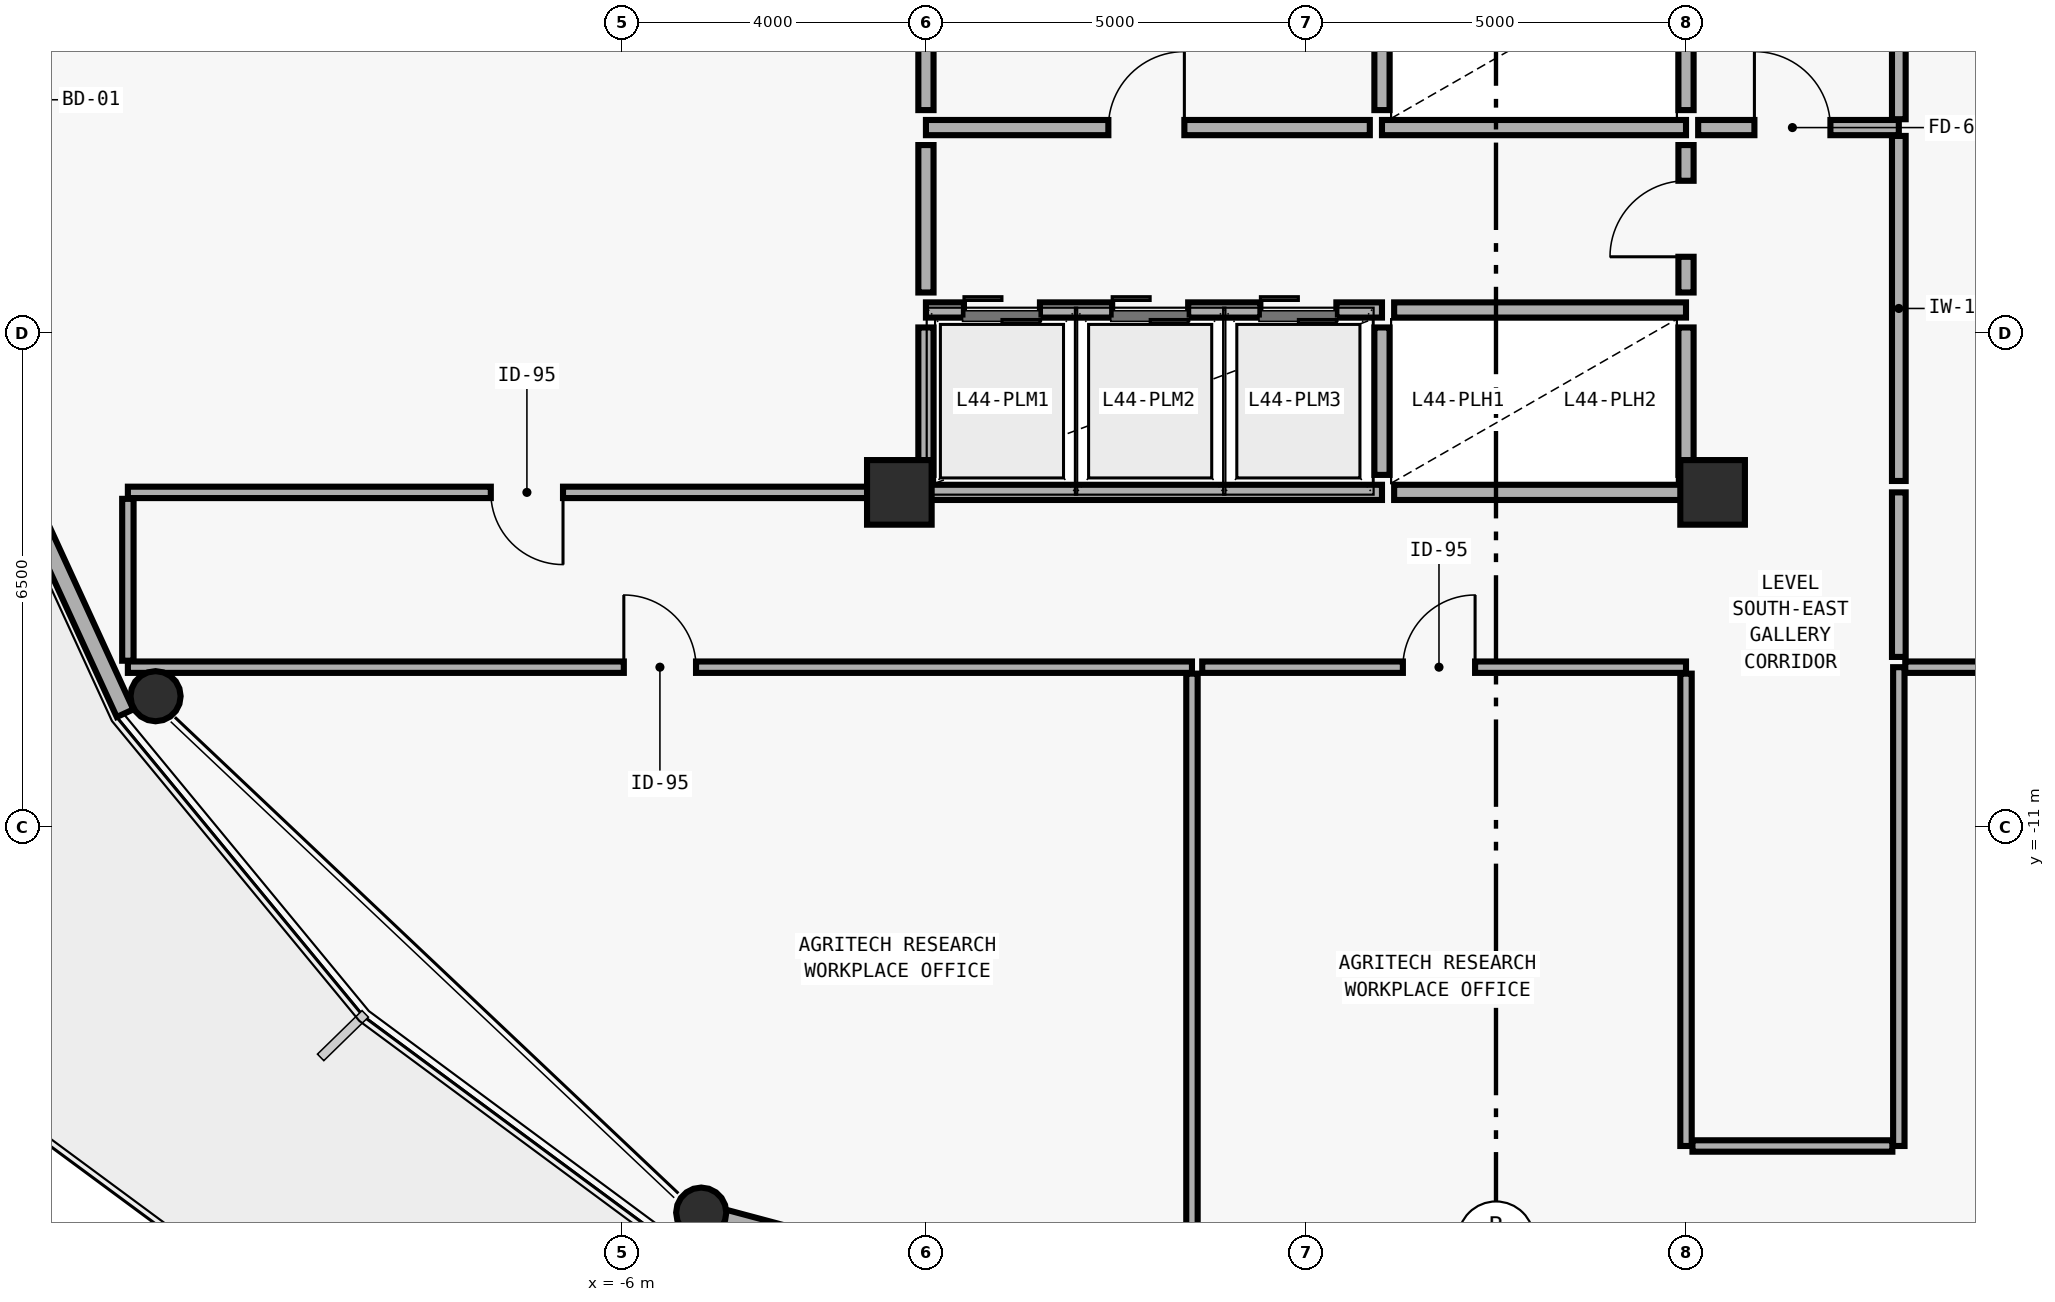
"""IFC4 building model, lengths in metres.
Left out: names, types, materials, properties, quantities, classifications, styles, units other than length and angle.
Written with IfcOpenShell. Run it as: python <this file> out.ifc"""

import sys

from ifc_helpers import new_model, si_unit, direction, frame, frame_2d, origin, origin_2d, place, context, subcontext, project, spatial, rectangle, hollow_circle, extrude, element, fill, save


model = new_model("IFC4")
c1 = context("Model", 3, precision=1e-05, world=origin(), true_north=direction((0.0, 1.0)))
c2 = subcontext(c1, "Body", "Model", "MODEL_VIEW")
j1 = project(units=[si_unit("LENGTHUNIT", "METRE"), si_unit("PLANEANGLEUNIT", "RADIAN")], contexts=[c1])
p1 = place(None, origin())
s1 = spatial("IfcSite", under=j1, at=p1, CompositionType="ELEMENT")
p2 = place(p1, origin())
s2 = spatial("IfcBuilding", under=s1, at=p2, CompositionType="ELEMENT")
p3 = place(p2, frame((0.0, 0.0, 178.8)))
s3 = spatial("IfcBuildingStorey", under=s2, at=p3, CompositionType="ELEMENT", Elevation=178.8)
for number, where, z_axis, x_axis in (
    (1, (-2.35, -6.6, 0.0), (0.0, 0.0, 1.0), (1.0, 0.0, 0.0)),
    (2, (8.35, -6.6, 0.0), (0.0, 0.0, 1.0), (1.0, 0.0, 0.0)),
):
    element("IfcColumn", number, at=place(p3, frame(where, z_axis=z_axis, x_axis=x_axis)), inside=s3, PredefinedType="COLUMN", context=c2, shape_type="SweptSolid", body=[
        extrude(rectangle(XDim=0.85, YDim=0.85, at=origin_2d()), origin(), (0.0, 0.0, 1.0), 3.575),
    ])
p4 = place(p3, frame((-12.165, -9.291, 0.0), z_axis=(0.016251167856, 0.004779755252, 0.999856516448), x_axis=(-0.282166323992, 0.959365501571, 0.0)))
e3 = element("IfcColumn", 3, at=p4, inside=s3, PredefinedType="COLUMN", context=c2, shape_type="SweptSolid", body=[
    extrude(hollow_circle(Radius=0.33, WallThickness=0.025, at=origin_2d()), origin(), (0.0, 0.0, 1.0), 3.575),
])
p5 = place(p3, frame((-4.973, -16.092, 0.0), z_axis=(0.00935528271, 0.008194408213, 0.999922662189), x_axis=(-0.658893247603, 0.75223645768, 0.0)))
e4 = element("IfcColumn", 4, at=p5, inside=s3, PredefinedType="COLUMN", context=c2, shape_type="SweptSolid", body=[
    extrude(hollow_circle(Radius=0.33, WallThickness=0.025, at=origin_2d()), origin(), (0.0, 0.0, 1.0), 3.575),
])
p6 = place(p3, frame((-12.537, -9.506, 0.0), z_axis=(0.0, 0.0, 1.0), x_axis=(-0.416959519789, 0.908925056788, 0.0)))
e5 = element("IfcWall", 5, at=p6, inside=s3, PredefinedType="SOLIDWALL", context=c2, shape_type="SweptSolid", body=[
    extrude(rectangle(XDim=5.019, YDim=0.24, at=frame_2d((2.51, 0.0))), origin(), (0.0, 0.0, 1.0), 2.93),
])
p7 = place(p3, frame((4.575, -18.642, 0.0), z_axis=(0.0, 0.0, 1.0), x_axis=(-0.966124239296, 0.258077419091, 0.0)))
e6 = element("IfcWall", 6, at=p7, inside=s3, PredefinedType="SOLIDWALL", context=c2, shape_type="SweptSolid", body=[
    extrude(rectangle(XDim=9.598, YDim=0.28, at=frame_2d((4.799, 0.0))), origin(), (0.0, 0.0, 1.0), 2.93),
])
p8 = place(p3, frame((4.0, -1.8, 0.0), z_axis=(0.0, 0.0, 1.0), x_axis=(1.0, 0.0, 0.0)))
e7 = element("IfcWall", 7, at=p8, inside=s3, PredefinedType="SOLIDWALL", context=c2, shape_type="SweptSolid", body=[
    extrude(rectangle(XDim=4.0, YDim=0.2, at=frame_2d((2.0, 0.0))), origin(), (0.0, 0.0, 1.0), 3.36),
])
p9 = place(p3, frame((4.0, -1.57, 0.0), z_axis=(0.0, 0.0, 1.0), x_axis=(0.0, 1.0, 0.0)))
e8 = element("IfcWall", 8, at=p9, inside=s3, PredefinedType="SOLIDWALL", context=c2, shape_type="SweptSolid", body=[
    extrude(rectangle(XDim=1.94, YDim=0.2, at=frame_2d((0.97, 0.0))), origin(), (0.0, 0.0, 1.0), 3.36),
])
p10 = place(p3, frame((8.0, -1.57, 0.0), z_axis=(0.0, 0.0, 1.0), x_axis=(0.0, 1.0, 0.0)))
e9 = element("IfcWall", 9, at=p10, inside=s3, PredefinedType="SOLIDWALL", context=c2, shape_type="SweptSolid", body=[
    extrude(rectangle(XDim=2.05, YDim=0.2, at=frame_2d((1.025, 0.0))), origin(), (0.0, 0.0, 1.0), 3.012),
])
p11 = place(p3, frame((-2.0, -4.2, 0.0), z_axis=(0.0, 0.0, 1.0), x_axis=(1.0, 0.0, 0.0)))
e10 = element("IfcWall", 10, at=p11, inside=s3, PredefinedType="SOLIDWALL", context=c2, shape_type="SweptSolid", body=[
    extrude(rectangle(XDim=6.0, YDim=0.2, at=frame_2d((3.0, 0.0))), origin(), (0.0, 0.0, 1.0), 3.36),
])
p12 = place(p11, frame((0.5, 0.0, 0.0)))
e11 = element("IfcOpeningElement", 11, at=p12, cuts=e10, PredefinedType="OPENING", context=c2, shape_type="SweptSolid", body=[
    extrude(rectangle(XDim=1.0, YDim=2.2, at=frame_2d((0.5, 1.1))), frame((0.0, 0.11, 0.0), z_axis=(0.0, -1.0, 0.0), x_axis=(1.0, 0.0, 0.0)), (0.0, 0.0, 1.0), 0.22),
])
p13 = place(p11, frame((2.45, 0.0, 0.0)))
e12 = element("IfcOpeningElement", 12, at=p13, cuts=e10, PredefinedType="OPENING", context=c2, shape_type="SweptSolid", body=[
    extrude(rectangle(XDim=1.0, YDim=2.2, at=frame_2d((0.5, 1.1))), frame((0.0, 0.11, 0.0), z_axis=(0.0, -1.0, 0.0), x_axis=(1.0, 0.0, 0.0)), (0.0, 0.0, 1.0), 0.22),
])
p14 = place(p11, frame((4.4, 0.0, 0.0)))
e13 = element("IfcOpeningElement", 13, at=p14, cuts=e10, PredefinedType="OPENING", context=c2, shape_type="SweptSolid", body=[
    extrude(rectangle(XDim=1.0, YDim=2.2, at=frame_2d((0.5, 1.1))), frame((0.0, 0.11, 0.0), z_axis=(0.0, -1.0, 0.0), x_axis=(1.0, 0.0, 0.0)), (0.0, 0.0, 1.0), 0.22),
])
p15 = place(p3, frame((-2.0, -6.6, 0.0), z_axis=(0.0, 0.0, 1.0), x_axis=(1.0, 0.0, 0.0)))
e14 = element("IfcWall", 14, at=p15, inside=s3, PredefinedType="SOLIDWALL", context=c2, shape_type="SweptSolid", body=[
    extrude(rectangle(XDim=6.0, YDim=0.2, at=frame_2d((3.0, 0.0))), origin(), (0.0, 0.0, 1.0), 3.012),
])
p16 = place(p3, frame((-2.0, -6.37, 0.0), z_axis=(0.0, 0.0, 1.0), x_axis=(0.0, 1.0, 0.0)))
e15 = element("IfcWall", 15, at=p16, inside=s3, PredefinedType="SOLIDWALL", context=c2, shape_type="SweptSolid", body=[
    extrude(rectangle(XDim=1.94, YDim=0.2, at=frame_2d((0.97, 0.0))), origin(), (0.0, 0.0, 1.0), 3.012),
])
p17 = place(p3, frame((4.16, -4.2, 0.0), z_axis=(0.0, 0.0, 1.0), x_axis=(1.0, 0.0, 0.0)))
e16 = element("IfcWall", 16, at=p17, inside=s3, PredefinedType="SOLIDWALL", context=c2, shape_type="SweptSolid", body=[
    extrude(rectangle(XDim=3.84, YDim=0.2, at=frame_2d((1.92, 0.0))), origin(), (0.0, 0.0, 1.0), 3.36),
])
p18 = place(p3, frame((4.16, -6.6, 0.0), z_axis=(0.0, 0.0, 1.0), x_axis=(1.0, 0.0, 0.0)))
e17 = element("IfcWall", 17, at=p18, inside=s3, PredefinedType="SOLIDWALL", context=c2, shape_type="SweptSolid", body=[
    extrude(rectangle(XDim=3.84, YDim=0.2, at=frame_2d((1.92, 0.0))), origin(), (0.0, 0.0, 1.0), 3.012),
])
p19 = place(p3, frame((4.0, -6.37, 0.0), z_axis=(0.0, 0.0, 1.0), x_axis=(0.0, 1.0, 0.0)))
e18 = element("IfcWall", 18, at=p19, inside=s3, PredefinedType="SOLIDWALL", context=c2, shape_type="SweptSolid", body=[
    extrude(rectangle(XDim=1.94, YDim=0.2, at=frame_2d((0.97, 0.0))), origin(), (0.0, 0.0, 1.0), 3.36),
])
p20 = place(p3, frame((8.0, -6.37, 0.0), z_axis=(0.0, 0.0, 1.0), x_axis=(0.0, 1.0, 0.0)))
e19 = element("IfcWall", 19, at=p20, inside=s3, PredefinedType="SOLIDWALL", context=c2, shape_type="SweptSolid", body=[
    extrude(rectangle(XDim=1.94, YDim=0.2, at=frame_2d((0.97, 0.0))), origin(), (0.0, 0.0, 1.0), 3.012),
])
p21 = place(p3, frame((8.0, -3.97, 0.0), z_axis=(0.0, 0.0, 1.0), x_axis=(0.0, 1.0, 0.0)))
e20 = element("IfcWall", 20, at=p21, inside=s3, PredefinedType="MOVABLE", context=c2, shape_type="SweptSolid", body=[
    extrude(rectangle(XDim=1.94, YDim=0.2, at=frame_2d((0.97, 0.0))), origin(), (0.0, 0.0, 1.0), 3.012),
])
p22 = place(p21, frame((0.47, 0.0, 0.0)))
e21 = element("IfcOpeningElement", 21, at=p22, cuts=e20, PredefinedType="OPENING", context=c2, shape_type="SweptSolid", body=[
    extrude(rectangle(XDim=1.0, YDim=2.1, at=frame_2d((0.5, 1.05))), frame((0.0, 0.11, 0.0), z_axis=(0.0, -1.0, 0.0), x_axis=(1.0, 0.0, 0.0)), (0.0, 0.0, 1.0), 0.22),
])
p23 = place(p3, frame((-2.0, -1.8, 0.0), z_axis=(0.0, 0.0, 1.0), x_axis=(1.0, 0.0, 0.0)))
e22 = element("IfcWall", 22, at=p23, inside=s3, PredefinedType="MOVABLE", context=c2, shape_type="SweptSolid", body=[
    extrude(rectangle(XDim=5.84, YDim=0.2, at=frame_2d((2.92, 0.0))), origin(), (0.0, 0.0, 1.0), 3.36),
])
p24 = place(p23, frame((2.4, 0.0, 0.0)))
e23 = element("IfcOpeningElement", 23, at=p24, cuts=e22, PredefinedType="OPENING", context=c2, shape_type="SweptSolid", body=[
    extrude(rectangle(XDim=1.0, YDim=2.1, at=frame_2d((0.5, 1.05))), frame((0.0, 0.11, 0.0), z_axis=(0.0, -1.0, 0.0), x_axis=(1.0, 0.0, 0.0)), (0.0, 0.0, 1.0), 0.22),
])
p25 = place(p3, frame((8.16, -1.8, 0.0), z_axis=(0.0, 0.0, 1.0), x_axis=(1.0, 0.0, 0.0)))
e24 = element("IfcWall", 24, at=p25, inside=s3, PredefinedType="MOVABLE", context=c2, shape_type="SweptSolid", body=[
    extrude(rectangle(XDim=2.64, YDim=0.2, at=frame_2d((1.32, 0.0))), origin(), (0.0, 0.0, 1.0), 3.36),
])
p26 = place(p25, frame((0.74, 0.0, 0.0)))
e25 = element("IfcOpeningElement", 25, at=p26, cuts=e24, PredefinedType="OPENING", context=c2, shape_type="SweptSolid", body=[
    extrude(rectangle(XDim=1.0, YDim=2.1, at=frame_2d((0.5, 1.05))), frame((0.0, 0.11, 0.0), z_axis=(0.0, -1.0, 0.0), x_axis=(1.0, 0.0, 0.0)), (0.0, 0.0, 1.0), 0.22),
])
p27 = place(p3, frame((-12.5, -8.9, 0.0), z_axis=(0.0, 0.0, 1.0), x_axis=(1.0, 0.0, 0.0)))
e26 = element("IfcWall", 26, at=p27, inside=s3, PredefinedType="PARTITIONING", context=c2, shape_type="SweptSolid", body=[
    extrude(rectangle(XDim=14.0, YDim=0.15, at=frame_2d((7.0, 0.0))), origin(), (0.0, 0.0, 1.0), 2.842),
])
p28 = place(p27, frame((6.525, 0.0, 0.0)))
e27 = element("IfcOpeningElement", 27, at=p28, cuts=e26, PredefinedType="OPENING", context=c2, shape_type="SweptSolid", body=[
    extrude(rectangle(XDim=0.95, YDim=2.1, at=frame_2d((0.475, 1.05))), frame((0.0, 0.085, 0.0), z_axis=(0.0, -1.0, 0.0), x_axis=(1.0, 0.0, 0.0)), (0.0, 0.0, 1.0), 0.17),
])
p29 = place(p3, frame((1.635, -8.9, 0.0), z_axis=(0.0, 0.0, 1.0), x_axis=(1.0, 0.0, 0.0)))
e28 = element("IfcWall", 28, at=p29, inside=s3, PredefinedType="PARTITIONING", context=c2, shape_type="SweptSolid", body=[
    extrude(rectangle(XDim=6.365, YDim=0.15, at=frame_2d((3.183, 0.0))), origin(), (0.0, 0.0, 1.0), 3.36),
])
p30 = place(p29, frame((2.64, 0.0, 0.0)))
e29 = element("IfcOpeningElement", 29, at=p30, cuts=e28, PredefinedType="OPENING", context=c2, shape_type="SweptSolid", body=[
    extrude(rectangle(XDim=0.95, YDim=2.1, at=frame_2d((0.475, 1.05))), frame((0.0, 0.085, 0.0), z_axis=(0.0, -1.0, 0.0), x_axis=(1.0, 0.0, 0.0)), (0.0, 0.0, 1.0), 0.17),
])
p31 = place(p3, frame((-2.16, -6.6, 0.0), z_axis=(0.0, 0.0, 1.0), x_axis=(-1.0, 0.0, 0.0)))
e30 = element("IfcWall", 30, at=p31, inside=s3, PredefinedType="PARTITIONING", context=c2, shape_type="SweptSolid", body=[
    extrude(rectangle(XDim=10.34, YDim=0.15, at=frame_2d((5.17, 0.0))), origin(), (0.0, 0.0, 1.0), 2.842),
])
p32 = place(p31, frame((4.615, 0.0, 0.0)))
e31 = element("IfcOpeningElement", 31, at=p32, cuts=e30, PredefinedType="OPENING", context=c2, shape_type="SweptSolid", body=[
    extrude(rectangle(XDim=0.95, YDim=2.1, at=frame_2d((0.475, 1.05))), frame((0.0, 0.085, 0.0), z_axis=(0.0, -1.0, 0.0), x_axis=(1.0, 0.0, 0.0)), (0.0, 0.0, 1.0), 0.17),
])
p33 = place(p3, frame((10.8, -1.69, 0.0), z_axis=(0.0, 0.0, 1.0), x_axis=(0.0, 1.0, 0.0)))
e32 = element("IfcWall", 32, at=p33, inside=s3, PredefinedType="PLUMBINGWALL", context=c2, shape_type="SweptSolid", body=[
    extrude(rectangle(XDim=5.19, YDim=0.18, at=frame_2d((2.595, 0.0))), origin(), (0.0, 0.0, 1.0), 3.36),
])
p34 = place(p33, frame((2.065, 0.0, 0.0)))
e33 = element("IfcOpeningElement", 33, at=p34, cuts=e32, PredefinedType="OPENING", context=c2, shape_type="SweptSolid", body=[
    extrude(rectangle(XDim=0.95, YDim=2.1, at=frame_2d((0.475, 1.05))), frame((0.0, 0.1, 0.0), z_axis=(0.0, -1.0, 0.0), x_axis=(1.0, 0.0, 0.0)), (0.0, 0.0, 1.0), 0.2),
])
p35 = place(p3, frame((-2.0, -3.97, 0.0), z_axis=(0.0, 0.0, 1.0), x_axis=(0.0, 1.0, 0.0)))
e34 = element("IfcWall", 34, at=p35, inside=s3, PredefinedType="MOVABLE", context=c2, shape_type="SweptSolid", body=[
    extrude(rectangle(XDim=1.94, YDim=0.2, at=frame_2d((0.97, 0.0))), origin(), (0.0, 0.0, 1.0), 3.012),
])
p36 = place(p3, frame((-2.0, -1.57, 0.0), z_axis=(0.0, 0.0, 1.0), x_axis=(0.0, 1.0, 0.0)))
e35 = element("IfcWall", 35, at=p36, inside=s3, PredefinedType="MOVABLE", context=c2, shape_type="SweptSolid", body=[
    extrude(rectangle(XDim=2.05, YDim=0.2, at=frame_2d((1.025, 0.0))), origin(), (0.0, 0.0, 1.0), 3.012),
])
p37 = place(p3, frame((1.5, -8.985, 0.0), z_axis=(0.0, 0.0, 1.0), x_axis=(0.0, -1.0, 0.0)))
e36 = element("IfcWall", 36, at=p37, inside=s3, PredefinedType="PARTITIONING", context=c2, shape_type="SweptSolid", body=[
    extrude(rectangle(XDim=9.594, YDim=0.15, at=frame_2d((4.797, 0.0))), origin(), (0.0, 0.0, 1.0), 3.36),
])
p38 = place(p3, frame((8.0, -8.985, 0.0), z_axis=(0.0, 0.0, 1.0), x_axis=(0.0, -1.0, 0.0)))
e37 = element("IfcWall", 37, at=p38, inside=s3, PredefinedType="PARTITIONING", context=c2, shape_type="SweptSolid", body=[
    extrude(rectangle(XDim=6.215, YDim=0.15, at=frame_2d((3.107, 0.0))), origin(), (0.0, 0.0, 1.0), 2.842),
])
p39 = place(p3, frame((10.8, -15.2, 0.0), z_axis=(0.0, 0.0, 1.0), x_axis=(0.0, 1.0, 0.0)))
e38 = element("IfcWall", 38, at=p39, inside=s3, PredefinedType="PARTITIONING", context=c2, shape_type="SweptSolid", body=[
    extrude(rectangle(XDim=6.3, YDim=0.15, at=frame_2d((3.15, 0.0))), origin(), (0.0, 0.0, 1.0), 3.36),
])
p40 = place(p3, frame((8.085, -15.2, 0.0), z_axis=(0.0, 0.0, 1.0), x_axis=(1.0, 0.0, 0.0)))
e39 = element("IfcWall", 39, at=p40, inside=s3, PredefinedType="PARTITIONING", context=c2, shape_type="SweptSolid", body=[
    extrude(rectangle(XDim=2.63, YDim=0.15, at=frame_2d((1.315, 0.0))), origin(), (0.0, 0.0, 1.0), 3.36),
])
p41 = place(p3, frame((10.885, -8.9, 0.0), z_axis=(0.0, 0.0, 1.0), x_axis=(1.0, 0.0, 0.0)))
e40 = element("IfcWall", 40, at=p41, inside=s3, PredefinedType="PARTITIONING", context=c2, shape_type="SweptSolid", body=[
    extrude(rectangle(XDim=1.615, YDim=0.15, at=frame_2d((0.808, 0.0))), origin(), (0.0, 0.0, 1.0), 3.36),
])
p42 = place(p3, frame((-12.5, -6.685, 0.0), z_axis=(0.0, 0.0, 1.0), x_axis=(0.0, -1.0, 0.0)))
e41 = element("IfcWall", 41, at=p42, inside=s3, PredefinedType="PARTITIONING", context=c2, shape_type="SweptSolid", body=[
    extrude(rectangle(XDim=2.13, YDim=0.15, at=frame_2d((1.065, 0.0))), origin(), (0.0, 0.0, 1.0), 2.942),
])
p43 = place(p3, frame((10.8, -8.765, 0.0), z_axis=(0.0, 0.0, 1.0), x_axis=(0.0, 1.0, 0.0)))
e42 = element("IfcWall", 42, at=p43, inside=s3, PredefinedType="PLUMBINGWALL", context=c2, shape_type="SweptSolid", body=[
    extrude(rectangle(XDim=2.165, YDim=0.18, at=frame_2d((1.083, 0.0))), origin(), (0.0, 0.0, 1.0), 3.36),
])
p44 = place(p3, frame((10.8, -6.45, 0.0), z_axis=(0.0, 0.0, 1.0), x_axis=(0.0, 1.0, 0.0)))
e43 = element("IfcWall", 43, at=p44, inside=s3, PredefinedType="PLUMBINGWALL", context=c2, shape_type="SweptSolid", body=[
    extrude(rectangle(XDim=4.54, YDim=0.18, at=frame_2d((2.27, 0.0))), origin(), (0.0, 0.0, 1.0), 3.36),
])
p45 = place(p22, origin())
e44 = element("IfcDoor", 44, at=p45, inside=s3, OperationType="SINGLE_SWING_LEFT", PredefinedType="DOOR", context=c2, shape_type="SweptSolid", body=[
    extrude(rectangle(XDim=1.0, YDim=2.1, at=frame_2d((0.5, 1.05))), frame((0.0, 0.025, 0.0), z_axis=(0.0, -1.0, 0.0), x_axis=(1.0, 0.0, 0.0)), (0.0, 0.0, 1.0), 0.05),
])
fill(e21, e44)
p46 = place(p24, origin())
e45 = element("IfcDoor", 45, at=p46, inside=s3, OperationType="SINGLE_SWING_RIGHT", PredefinedType="DOOR", context=c2, shape_type="SweptSolid", body=[
    extrude(rectangle(XDim=1.0, YDim=2.1, at=frame_2d((0.5, 1.05))), frame((0.0, 0.025, 0.0), z_axis=(0.0, -1.0, 0.0), x_axis=(1.0, 0.0, 0.0)), (0.0, 0.0, 1.0), 0.05),
])
fill(e23, e45)
p47 = place(p26, origin())
e46 = element("IfcDoor", 46, at=p47, inside=s3, OperationType="SINGLE_SWING_LEFT", PredefinedType="DOOR", context=c2, shape_type="SweptSolid", body=[
    extrude(rectangle(XDim=1.0, YDim=2.1, at=frame_2d((0.5, 1.05))), frame((0.0, 0.025, 0.0), z_axis=(0.0, -1.0, 0.0), x_axis=(1.0, 0.0, 0.0)), (0.0, 0.0, 1.0), 0.05),
])
fill(e25, e46)
p48 = place(p28, origin())
e47 = element("IfcDoor", 47, at=p48, inside=s3, OperationType="SINGLE_SWING_LEFT", PredefinedType="DOOR", context=c2, shape_type="SweptSolid", body=[
    extrude(rectangle(XDim=0.95, YDim=2.1, at=frame_2d((0.475, 1.05))), frame((0.0, 0.025, 0.0), z_axis=(0.0, -1.0, 0.0), x_axis=(1.0, 0.0, 0.0)), (0.0, 0.0, 1.0), 0.05),
])
fill(e27, e47)
p49 = place(p30, origin())
e48 = element("IfcDoor", 48, at=p49, inside=s3, OperationType="SINGLE_SWING_RIGHT", PredefinedType="DOOR", context=c2, shape_type="SweptSolid", body=[
    extrude(rectangle(XDim=0.95, YDim=2.1, at=frame_2d((0.475, 1.05))), frame((0.0, 0.025, 0.0), z_axis=(0.0, -1.0, 0.0), x_axis=(1.0, 0.0, 0.0)), (0.0, 0.0, 1.0), 0.05),
])
fill(e29, e48)
p50 = place(p32, origin())
e49 = element("IfcDoor", 49, at=p50, inside=s3, OperationType="SINGLE_SWING_LEFT", PredefinedType="DOOR", context=c2, shape_type="SweptSolid", body=[
    extrude(rectangle(XDim=0.95, YDim=2.1, at=frame_2d((0.475, 1.05))), frame((0.0, 0.025, 0.0), z_axis=(0.0, -1.0, 0.0), x_axis=(1.0, 0.0, 0.0)), (0.0, 0.0, 1.0), 0.05),
])
fill(e31, e49)
p51 = place(p12, origin())
e50 = element("IfcDoor", 50, at=p51, inside=s3, OperationType="DOUBLE_DOOR_SLIDING", PredefinedType="DOOR", context=c2, shape_type="SweptSolid", body=[
    extrude(rectangle(XDim=1.0, YDim=2.2, at=frame_2d((0.5, 1.1))), frame((0.0, 0.025, 0.0), z_axis=(0.0, -1.0, 0.0), x_axis=(1.0, 0.0, 0.0)), (0.0, 0.0, 1.0), 0.05),
])
fill(e11, e50)
p52 = place(p13, origin())
e51 = element("IfcDoor", 51, at=p52, inside=s3, OperationType="DOUBLE_DOOR_SLIDING", PredefinedType="DOOR", context=c2, shape_type="SweptSolid", body=[
    extrude(rectangle(XDim=1.0, YDim=2.2, at=frame_2d((0.5, 1.1))), frame((0.0, 0.025, 0.0), z_axis=(0.0, -1.0, 0.0), x_axis=(1.0, 0.0, 0.0)), (0.0, 0.0, 1.0), 0.05),
])
fill(e12, e51)
p53 = place(p14, origin())
e52 = element("IfcDoor", 52, at=p53, inside=s3, OperationType="DOUBLE_DOOR_SLIDING", PredefinedType="DOOR", context=c2, shape_type="SweptSolid", body=[
    extrude(rectangle(XDim=1.0, YDim=2.2, at=frame_2d((0.5, 1.1))), frame((0.0, 0.025, 0.0), z_axis=(0.0, -1.0, 0.0), x_axis=(1.0, 0.0, 0.0)), (0.0, 0.0, 1.0), 0.05),
])
fill(e13, e52)
save(model, sys.argv[1])
